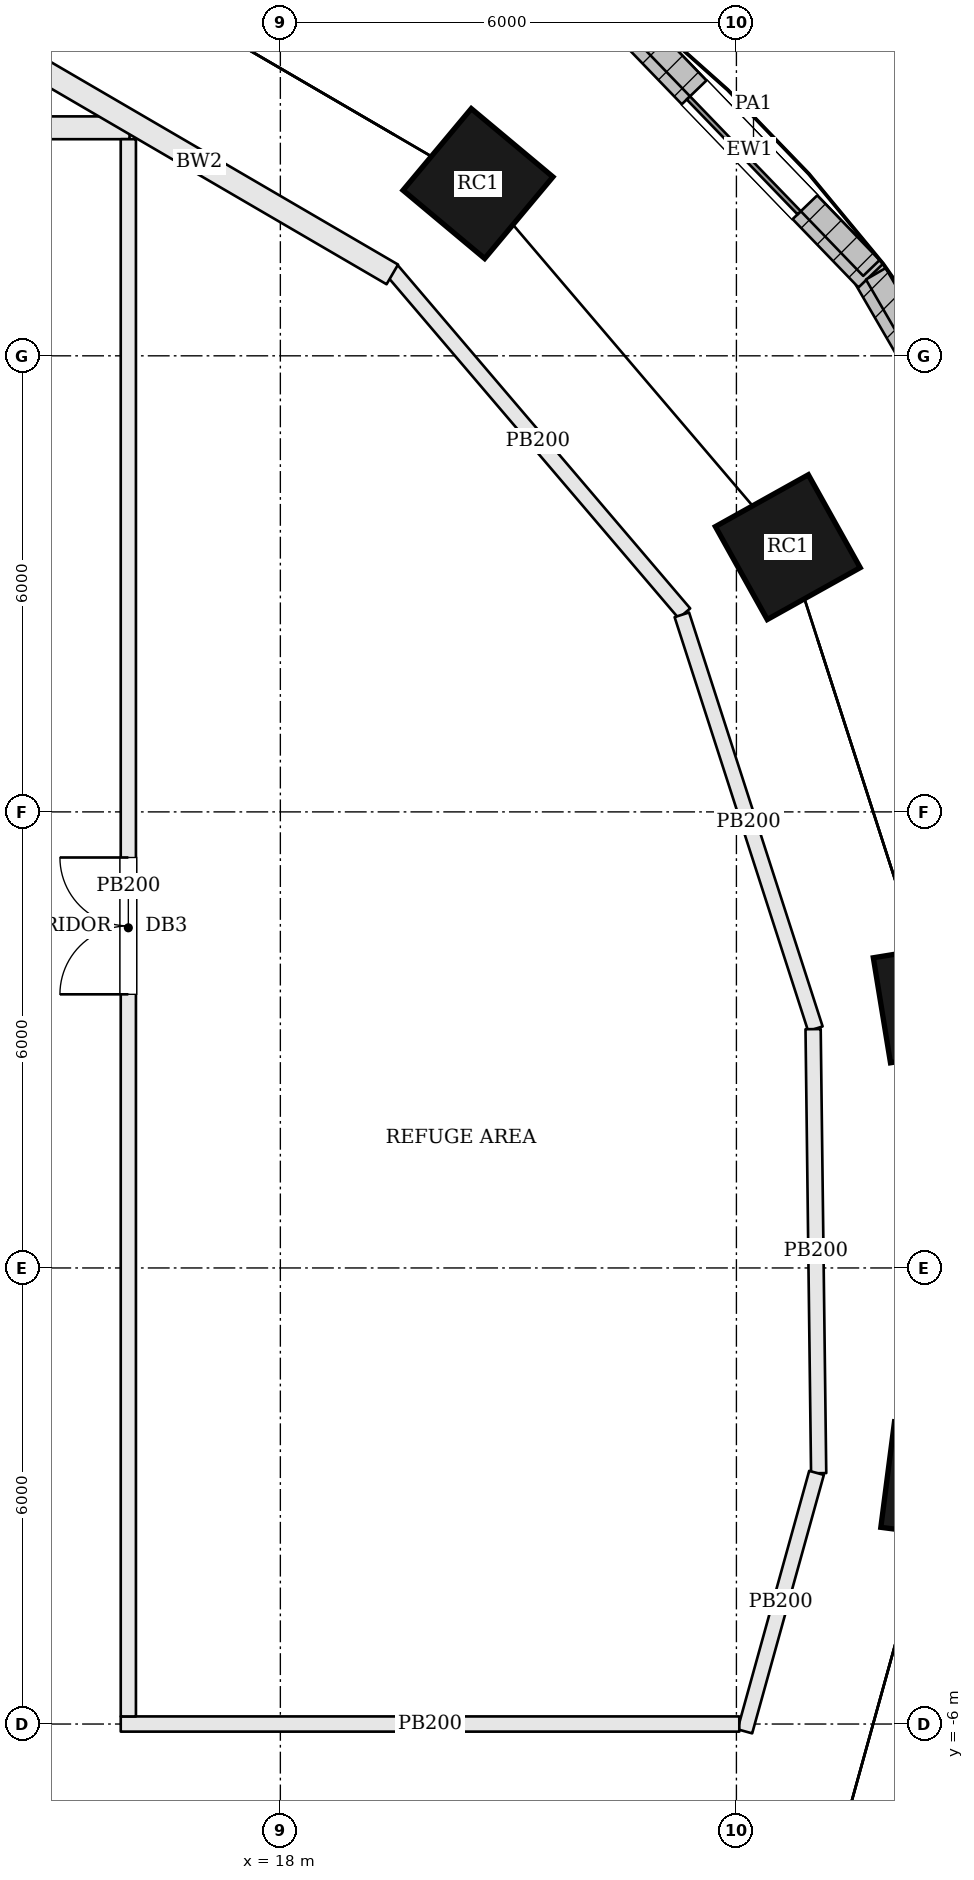
"""IFC4 building model, lengths in metres.
Left out: names, types, materials, properties, quantities, classifications, styles, units other than length and angle.
Written with IfcOpenShell. Run it as: python <this file> out.ifc"""

import sys

from ifc_helpers import new_model, si_unit, direction, frame, frame_2d, origin, origin_2d, place, context, subcontext, project, spatial, rectangle, extrude, element, fill, save


model = new_model("IFC4")
c1 = context("Model", 3, precision=1e-05, world=origin(), true_north=direction((0.0, 1.0)))
c2 = subcontext(c1, "Body", "Model", "MODEL_VIEW")
j1 = project(units=[si_unit("LENGTHUNIT", "METRE"), si_unit("PLANEANGLEUNIT", "RADIAN")], contexts=[c1])
p1 = place(None, origin())
s1 = spatial("IfcSite", under=j1, at=p1, CompositionType="ELEMENT")
p2 = place(p1, origin())
s2 = spatial("IfcBuilding", under=s1, at=p2, CompositionType="ELEMENT")
p3 = place(p2, frame((0.0, 0.0, 33.0)))
s3 = spatial("IfcBuildingStorey", under=s2, at=p3, CompositionType="ELEMENT", Elevation=33.0)
for number, where, z_axis, x_axis in (
    (1, (26.605, 3.503, 0.0), (0.0, 0.0, 1.0), (-0.161, 0.987, 0.0)),
    (2, (24.676, 9.483, 0.0), (0.0, 0.0, 1.0), (-0.487, 0.873, 0.0)),
    (3, (20.6, 14.266, 0.0), (0.0, 0.0, 1.0), (-0.767, 0.641, 0.0)),
    (4, (26.684, -2.808, 0.0), (0.0, 0.0, 1.0), (0.128, 0.992, 0.0)),
):
    element("IfcColumn", number, at=place(p3, frame(where, z_axis=z_axis, x_axis=x_axis)), inside=s3, PredefinedType="COLUMN", context=c2, shape_type="SweptSolid", body=[
        extrude(rectangle(XDim=1.4, YDim=1.4, at=origin_2d()), origin(), (0.0, 0.0, 1.0), 4.5),
    ])
p4 = place(p3, frame((28.073, 9.072, 0.0), z_axis=(0.0, 0.0, 1.0), x_axis=(-0.502106426501, 0.864805837438, 0.0)))
e5 = element("IfcWall", 5, at=p4, inside=s3, PredefinedType="SOLIDWALL", context=c2, shape_type="SweptSolid", body=[
    extrude(rectangle(XDim=4.657, YDim=0.45, at=frame_2d((2.328, 0.0))), origin(), (0.0, 0.0, 1.0), 4.3),
])
p5 = place(p4, frame((1.278, 0.0, 1.2)))
e6 = element("IfcOpeningElement", 6, at=p5, cuts=e5, PredefinedType="OPENING", context=c2, shape_type="SweptSolid", body=[
    extrude(rectangle(XDim=2.1, YDim=1.8, at=frame_2d((1.05, 0.9))), frame((0.0, 0.235, 0.0), z_axis=(0.0, -1.0, 0.0), x_axis=(1.0, 0.0, 0.0)), (0.0, 0.0, 1.0), 0.47),
])
p6 = place(p3, frame((25.768, 13.056, 0.0), z_axis=(0.0, 0.0, 1.0), x_axis=(-0.694191591241, 0.719790271294, 0.0)))
e7 = element("IfcWall", 7, at=p6, inside=s3, PredefinedType="SOLIDWALL", context=c2, shape_type="SweptSolid", body=[
    extrude(rectangle(XDim=4.597, YDim=0.45, at=frame_2d((2.298, 0.0))), origin(), (0.0, 0.0, 1.0), 4.3),
])
p7 = place(p6, frame((1.249, 0.0, 1.2)))
e8 = element("IfcOpeningElement", 8, at=p7, cuts=e7, PredefinedType="OPENING", context=c2, shape_type="SweptSolid", body=[
    extrude(rectangle(XDim=2.1, YDim=1.8, at=frame_2d((1.05, 0.9))), frame((0.0, 0.235, 0.0), z_axis=(0.0, -1.0, 0.0), x_axis=(1.0, 0.0, 0.0)), (0.0, 0.0, 1.0), 0.47),
])
p8 = place(p3, frame((27.126, 10.854, 4.5), z_axis=(0.0, 0.0, 1.0), x_axis=(-0.502153823608, 0.864778316932, 0.0)))
e9 = element("IfcWall", 9, at=p8, inside=s3, PredefinedType="PARAPET", context=c2, shape_type="SweptSolid", body=[
    extrude(rectangle(XDim=2.574, YDim=0.3, at=frame_2d((1.287, 0.0))), origin(), (0.0, 0.0, 1.0), 1.1),
])
p9 = place(p3, frame((25.776, 13.156, 4.5), z_axis=(0.0, 0.0, 1.0), x_axis=(-0.694124449593, 0.719855019068, 0.0)))
e10 = element("IfcWall", 10, at=p9, inside=s3, PredefinedType="PARAPET", context=c2, shape_type="SweptSolid", body=[
    extrude(rectangle(XDim=4.469, YDim=0.3, at=frame_2d((2.234, 0.0))), origin(), (0.0, 0.0, 1.0), 1.1),
])
p10 = place(p3, frame((-16.089, 15.0, 0.0), z_axis=(0.0, 0.0, 1.0), x_axis=(1.0, 0.0, 0.0)))
e11 = element("IfcWall", 11, at=p10, inside=s3, PredefinedType="SOLIDWALL", context=c2, shape_type="SweptSolid", body=[
    extrude(rectangle(XDim=32.105, YDim=0.3, at=frame_2d((16.053, 0.0))), origin(), (0.0, 0.0, 1.0), 4.3),
])
p11 = place(p10, frame((3.089, 0.0, 0.0)))
e12 = element("IfcOpeningElement", 12, at=p11, cuts=e11, PredefinedType="OPENING", context=c2, shape_type="SweptSolid", body=[
    extrude(rectangle(XDim=1.0, YDim=2.1, at=frame_2d((0.5, 1.05))), frame((0.0, 0.16, 0.0), z_axis=(0.0, -1.0, 0.0), x_axis=(1.0, 0.0, 0.0)), (0.0, 0.0, 1.0), 0.32),
])
p12 = place(p10, frame((15.589, 0.0, 0.0)))
e13 = element("IfcOpeningElement", 13, at=p12, cuts=e11, PredefinedType="OPENING", context=c2, shape_type="SweptSolid", body=[
    extrude(rectangle(XDim=1.0, YDim=2.1, at=frame_2d((0.5, 1.05))), frame((0.0, 0.16, 0.0), z_axis=(0.0, -1.0, 0.0), x_axis=(1.0, 0.0, 0.0)), (0.0, 0.0, 1.0), 0.32),
])
p13 = place(p10, frame((28.089, 0.0, 0.0)))
e14 = element("IfcOpeningElement", 14, at=p13, cuts=e11, PredefinedType="OPENING", context=c2, shape_type="SweptSolid", body=[
    extrude(rectangle(XDim=1.0, YDim=2.1, at=frame_2d((0.5, 1.05))), frame((0.0, 0.16, 0.0), z_axis=(0.0, -1.0, 0.0), x_axis=(1.0, 0.0, 0.0)), (0.0, 0.0, 1.0), 0.32),
])
p14 = place(p3, frame((19.462, 13.135, 0.0), z_axis=(0.0, 0.0, 1.0), x_axis=(0.648575792529, -0.761150078069, 0.0)))
e15 = element("IfcWall", 15, at=p14, inside=s3, PredefinedType="PARTITIONING", context=c2, shape_type="SweptSolid", body=[
    extrude(rectangle(XDim=5.942, YDim=0.2, at=frame_2d((2.971, 0.0))), origin(), (0.0, 0.0, 1.0), 4.3),
])
p15 = place(p3, frame((23.282, 8.593, 0.0), z_axis=(0.0, 0.0, 1.0), x_axis=(0.307048901132, -0.951693738717, 0.0)))
e16 = element("IfcWall", 16, at=p15, inside=s3, PredefinedType="PARTITIONING", context=c2, shape_type="SweptSolid", body=[
    extrude(rectangle(XDim=5.722, YDim=0.2, at=frame_2d((2.861, 0.0))), origin(), (0.0, 0.0, 1.0), 4.3),
])
p16 = place(p3, frame((25.009, 3.142, 0.0), z_axis=(0.0, 0.0, 1.0), x_axis=(0.012494323245, -0.999921942897, 0.0)))
e17 = element("IfcWall", 17, at=p16, inside=s3, PredefinedType="PARTITIONING", context=c2, shape_type="SweptSolid", body=[
    extrude(rectangle(XDim=5.843, YDim=0.2, at=frame_2d((2.921, 0.0))), origin(), (0.0, 0.0, 1.0), 4.3),
])
p17 = place(p3, frame((25.054, -2.696, 0.0), z_axis=(0.0, 0.0, 1.0), x_axis=(-0.267236988138, -0.963630838117, 0.0)))
e18 = element("IfcWall", 18, at=p17, inside=s3, PredefinedType="PARTITIONING", context=c2, shape_type="SweptSolid", body=[
    extrude(rectangle(XDim=3.528, YDim=0.2, at=frame_2d((1.764, 0.0))), origin(), (0.0, 0.0, 1.0), 4.3),
])
p18 = place(p3, frame((24.038, -6.0, 0.0), z_axis=(0.0, 0.0, 1.0), x_axis=(-1.0, 0.0, 0.0)))
e19 = element("IfcWall", 19, at=p18, inside=s3, PredefinedType="PARTITIONING", context=c2, shape_type="SweptSolid", body=[
    extrude(rectangle(XDim=8.138, YDim=0.2, at=frame_2d((4.069, 0.0))), origin(), (0.0, 0.0, 1.0), 4.3),
])
p19 = place(p3, frame((16.0, -5.9, 0.0), z_axis=(0.0, 0.0, 1.0), x_axis=(0.0, 1.0, 0.0)))
e20 = element("IfcWall", 20, at=p19, inside=s3, PredefinedType="PARTITIONING", context=c2, shape_type="SweptSolid", body=[
    extrude(rectangle(XDim=20.75, YDim=0.2, at=frame_2d((10.375, 0.0))), origin(), (0.0, 0.0, 1.0), 4.3),
])
p20 = place(p19, frame((9.5, 0.0, 0.0)))
e21 = element("IfcOpeningElement", 21, at=p20, cuts=e20, PredefinedType="OPENING", context=c2, shape_type="SweptSolid", body=[
    extrude(rectangle(XDim=1.8, YDim=2.1, at=frame_2d((0.9, 1.05))), frame((0.0, 0.11, 0.0), z_axis=(0.0, -1.0, 0.0), x_axis=(1.0, 0.0, 0.0)), (0.0, 0.0, 1.0), 0.22),
])
p21 = place(p3, frame((14.392, 16.035, 0.0), z_axis=(0.0, 0.0, 1.0), x_axis=(0.863774384703, -0.503878767493, 0.0)))
e22 = element("IfcWall", 22, at=p21, inside=s3, PredefinedType="SOLIDWALL", context=c2, shape_type="SweptSolid", body=[
    extrude(rectangle(XDim=5.882, YDim=0.3, at=frame_2d((2.941, 0.0))), origin(), (0.0, 0.0, 1.0), 4.3),
])
p22 = place(p7, origin())
e23 = element("IfcWindow", 23, at=p22, inside=s3, PartitioningType="SINGLE_PANEL", PredefinedType="WINDOW", context=c2, shape_type="SweptSolid", body=[
    extrude(rectangle(XDim=2.1, YDim=1.8, at=frame_2d((1.05, 0.9))), frame((0.0, 0.135, 0.0), z_axis=(0.0, -1.0, 0.0), x_axis=(1.0, 0.0, 0.0)), (0.0, 0.0, 1.0), 0.06),
])
fill(e8, e23)
p23 = place(p20, origin())
e24 = element("IfcDoor", 24, at=p23, inside=s3, OperationType="DOUBLE_DOOR_SINGLE_SWING", PredefinedType="DOOR", context=c2, shape_type="SweptSolid", body=[
    extrude(rectangle(XDim=1.8, YDim=2.1, at=frame_2d((0.9, 1.05))), frame((0.0, 0.025, 0.0), z_axis=(0.0, -1.0, 0.0), x_axis=(1.0, 0.0, 0.0)), (0.0, 0.0, 1.0), 0.05),
])
fill(e21, e24)
save(model, sys.argv[1])
